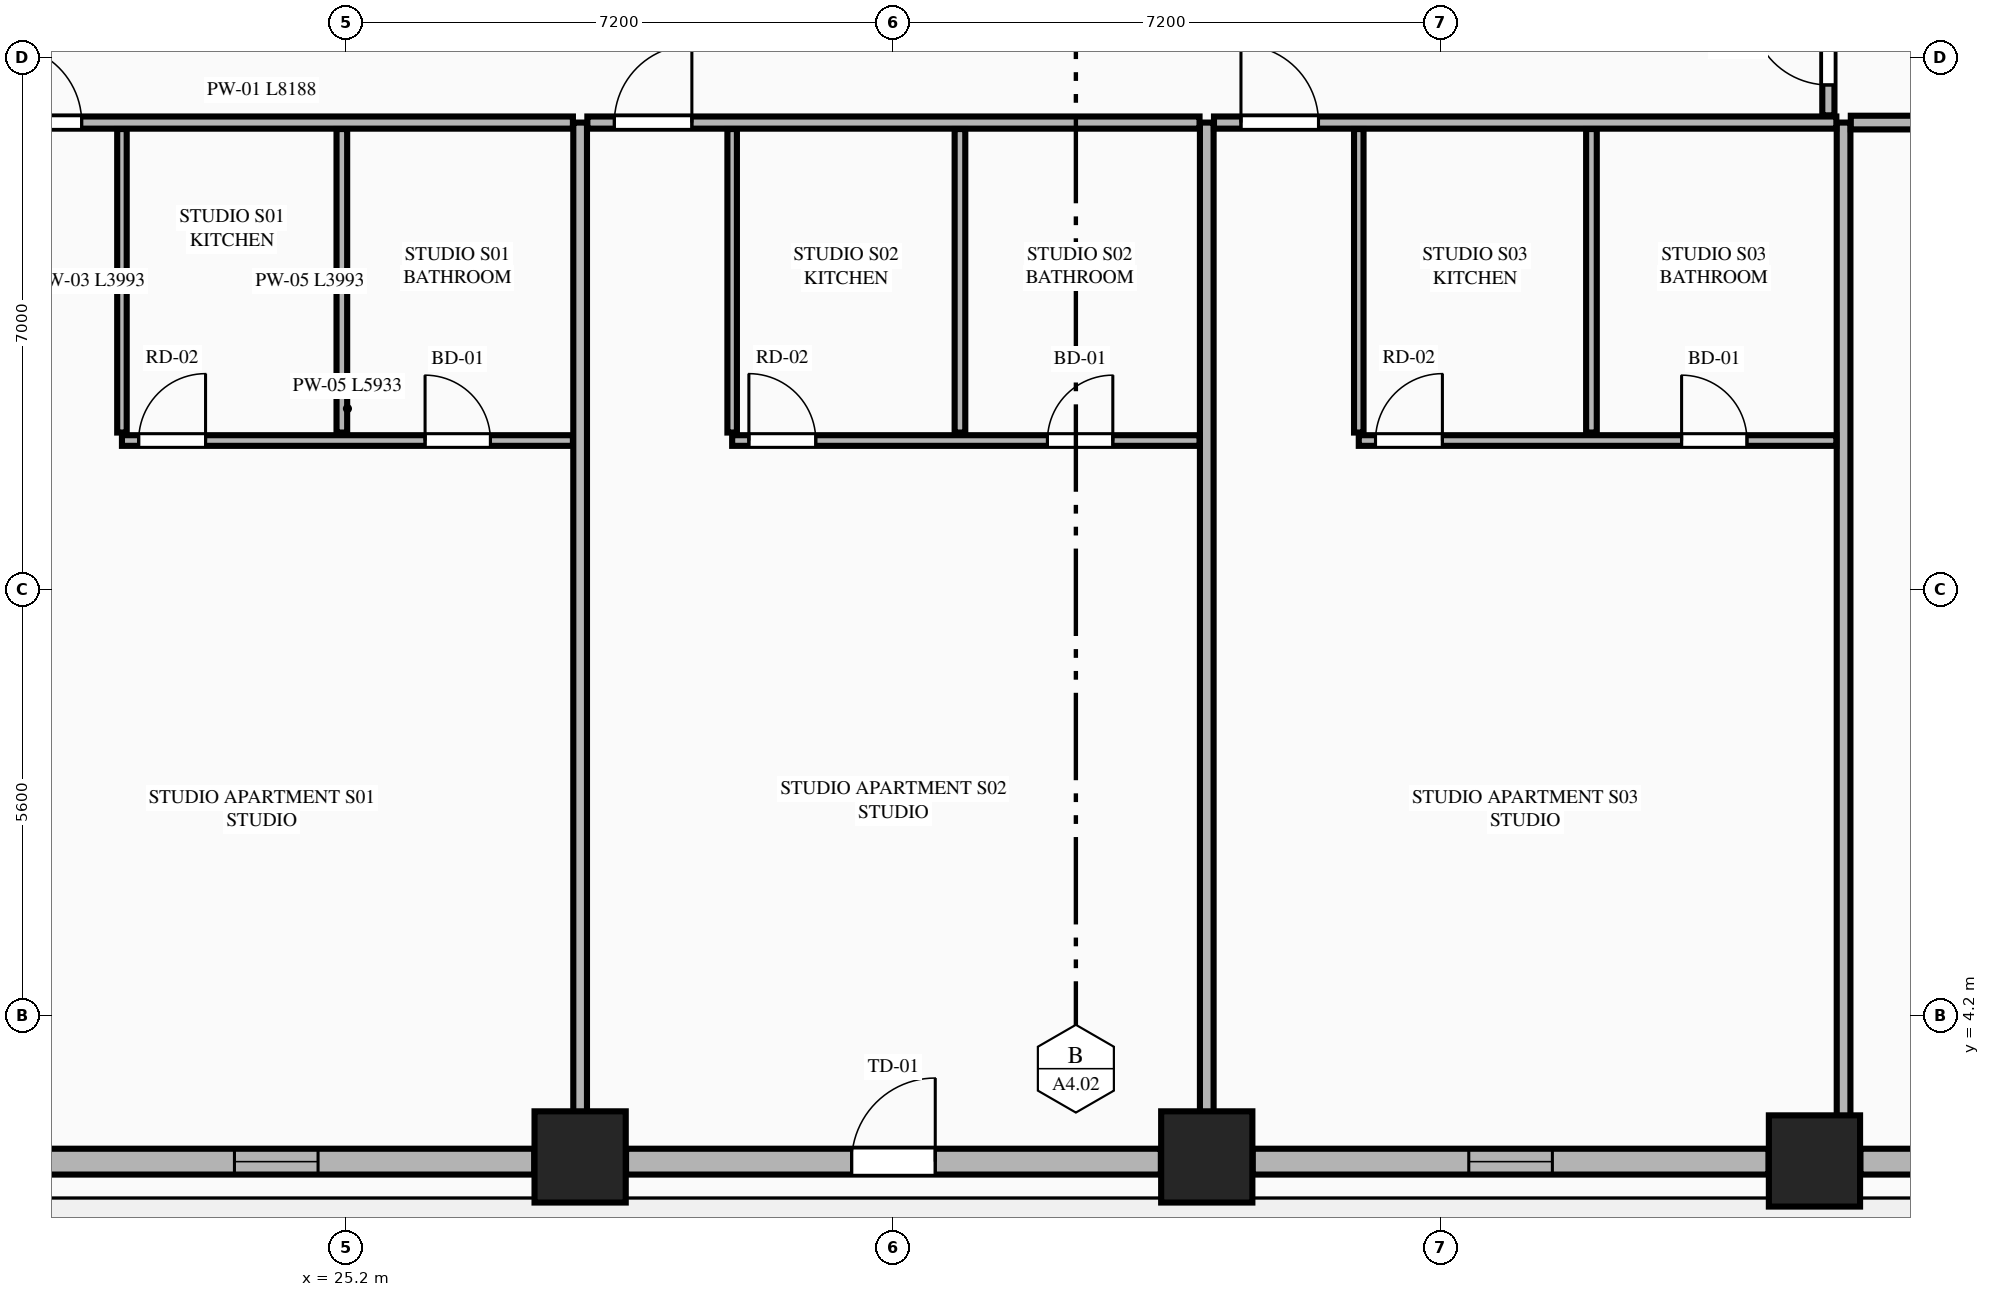
"""IFC4 building model, lengths in metres.
Left out: names, types, materials, properties, quantities, classifications, styles, units other than length and angle.
Written with IfcOpenShell. Run it as: python <this file> out.ifc"""

import sys

from ifc_helpers import new_model, si_unit, direction, frame, frame_2d, origin, origin_2d, place, context, subcontext, project, spatial, rectangle, extrude, element, fill, save


model = new_model("IFC4")
c1 = context("Model", 3, precision=1e-05, world=origin(), true_north=direction((0.0, 1.0)))
c2 = subcontext(c1, "Body", "Model", "MODEL_VIEW")
j1 = project(units=[si_unit("LENGTHUNIT", "METRE"), si_unit("PLANEANGLEUNIT", "RADIAN")], contexts=[c1])
p1 = place(None, origin())
s1 = spatial("IfcSite", under=j1, at=p1, CompositionType="ELEMENT")
p2 = place(p1, origin())
s2 = spatial("IfcBuilding", under=s1, at=p2, CompositionType="ELEMENT")
p3 = place(p2, frame((0.0, 0.0, 42.65)))
s3 = spatial("IfcBuildingStorey", under=s2, at=p3, CompositionType="ELEMENT", Elevation=42.65)
for number, where, z_axis, x_axis in (
    (1, (28.278, 2.342, 0.0), (0.0, 0.0, 1.0), (1.0, 0.0, 0.0)),
    (2, (36.522, 2.342, 0.0), (0.0, 0.0, 1.0), (1.0, 0.0, 0.0)),
    (3, (44.517, 2.289, 0.0), (0.0, 0.0, 1.0), (1.0, 0.0, 0.0)),
):
    element("IfcColumn", number, at=place(p3, frame(where, z_axis=z_axis, x_axis=x_axis)), inside=s3, PredefinedType="COLUMN", context=c2, shape_type="SweptSolid", body=[
        extrude(rectangle(XDim=1.2, YDim=1.2, at=origin_2d()), origin(), (0.0, 0.0, 1.0), 3.55),
    ])
p4 = place(p3, frame((20.887, 2.28, 0.0), z_axis=(0.0, 0.0, 1.0), x_axis=(1.0, 0.0, 0.0)))
e4 = element("IfcWall", 4, at=p4, inside=s3, PredefinedType="STANDARD", context=c2, shape_type="SweptSolid", body=[
    extrude(rectangle(XDim=6.787, YDim=0.34, at=frame_2d((3.394, 0.0))), origin(), (0.0, 0.0, 1.0), 2.787),
])
p5 = place(p4, frame((2.843, 0.0, 0.75)))
e5 = element("IfcOpeningElement", 5, at=p5, cuts=e4, PredefinedType="OPENING", context=c2, shape_type="SweptSolid", body=[
    extrude(rectangle(XDim=1.1, YDim=1.887, at=frame_2d((0.55, 0.943))), frame((0.0, 0.18, 0.0), z_axis=(0.0, -1.0, 0.0), x_axis=(1.0, 0.0, 0.0)), (0.0, 0.0, 1.0), 0.36),
])
p6 = place(p3, frame((28.882, 2.28, 0.0), z_axis=(0.0, 0.0, 1.0), x_axis=(1.0, 0.0, 0.0)))
e6 = element("IfcWall", 6, at=p6, inside=s3, PredefinedType="STANDARD", context=c2, shape_type="SweptSolid", body=[
    extrude(rectangle(XDim=7.036, YDim=0.34, at=frame_2d((3.518, 0.0))), origin(), (0.0, 0.0, 1.0), 2.787),
])
p7 = place(p6, frame((2.968, 0.0, 0.0)))
e7 = element("IfcOpeningElement", 7, at=p7, cuts=e6, PredefinedType="OPENING", context=c2, shape_type="SweptSolid", body=[
    extrude(rectangle(XDim=1.1, YDim=2.25, at=frame_2d((0.55, 1.125))), frame((0.0, 0.18, 0.0), z_axis=(0.0, -1.0, 0.0), x_axis=(1.0, 0.0, 0.0)), (0.0, 0.0, 1.0), 0.36),
])
p8 = place(p3, frame((37.126, 2.28, 0.0), z_axis=(0.0, 0.0, 1.0), x_axis=(1.0, 0.0, 0.0)))
e8 = element("IfcWall", 8, at=p8, inside=s3, PredefinedType="STANDARD", context=c2, shape_type="SweptSolid", body=[
    extrude(rectangle(XDim=6.787, YDim=0.34, at=frame_2d((3.394, 0.0))), origin(), (0.0, 0.0, 1.0), 2.787),
])
p9 = place(p8, frame((2.843, 0.0, 0.75)))
e9 = element("IfcOpeningElement", 9, at=p9, cuts=e8, PredefinedType="OPENING", context=c2, shape_type="SweptSolid", body=[
    extrude(rectangle(XDim=1.1, YDim=1.887, at=frame_2d((0.55, 0.943))), frame((0.0, 0.18, 0.0), z_axis=(0.0, -1.0, 0.0), x_axis=(1.0, 0.0, 0.0)), (0.0, 0.0, 1.0), 0.36),
])
p10 = place(p3, frame((45.121, 2.28, 0.0), z_axis=(0.0, 0.0, 1.0), x_axis=(1.0, 0.0, 0.0)))
e10 = element("IfcWall", 10, at=p10, inside=s3, PredefinedType="STANDARD", context=c2, shape_type="SweptSolid", body=[
    extrude(rectangle(XDim=1.245, YDim=0.34, at=frame_2d((0.623, 0.0))), origin(), (0.0, 0.0, 1.0), 3.33),
])
for number, where, z_axis, x_axis in (
    (11, (28.278, 2.455, 0.0), (0.0, 0.0, 1.0), (0.0, 1.0, 0.0)),
    (12, (36.522, 2.455, 0.0), (0.0, 0.0, 1.0), (0.0, 1.0, 0.0)),
):
    element("IfcWall", number, at=place(p3, frame(where, z_axis=z_axis, x_axis=x_axis)), inside=s3, PredefinedType="PARTITIONING", context=c2, shape_type="SweptSolid", body=[
        extrude(rectangle(XDim=13.495, YDim=0.18, at=frame_2d((6.748, 0.0))), origin(), (0.0, 0.0, 1.0), 2.7),
    ])
p11 = place(p3, frame((44.9, 2.455, 0.0), z_axis=(0.0, 0.0, 1.0), x_axis=(0.0, 1.0, 0.0)))
e13 = element("IfcWall", 13, at=p11, inside=s3, PredefinedType="PARTITIONING", context=c2, shape_type="SweptSolid", body=[
    extrude(rectangle(XDim=13.495, YDim=0.18, at=frame_2d((6.748, 0.0))), origin(), (0.0, 0.0, 1.0), 3.33),
])
p12 = place(p3, frame((19.995, 15.95, 0.0), z_axis=(0.0, 0.0, 1.0), x_axis=(1.0, 0.0, 0.0)))
e14 = element("IfcWall", 14, at=p12, inside=s3, PredefinedType="PARTITIONING", context=c2, shape_type="SweptSolid", body=[
    extrude(rectangle(XDim=8.188, YDim=0.16, at=frame_2d((4.094, 0.0))), origin(), (0.0, 0.0, 1.0), 3.33),
])
p13 = place(p12, frame((0.705, 0.0, 0.0)))
e15 = element("IfcOpeningElement", 15, at=p13, cuts=e14, PredefinedType="OPENING", context=c2, shape_type="SweptSolid", body=[
    extrude(rectangle(XDim=1.02, YDim=2.25, at=frame_2d((0.51, 1.125))), frame((0.0, 0.09, 0.0), z_axis=(0.0, -1.0, 0.0), x_axis=(1.0, 0.0, 0.0)), (0.0, 0.0, 1.0), 0.18),
])
p14 = place(p3, frame((22.25, 11.872, 0.0), z_axis=(0.0, 0.0, 1.0), x_axis=(0.0, 1.0, 0.0)))
e16 = element("IfcWall", 16, at=p14, inside=s3, PredefinedType="PARTITIONING", context=c2, shape_type="SweptSolid", body=[
    extrude(rectangle(XDim=3.993, YDim=0.125, at=frame_2d((1.997, 0.0))), origin(), (0.0, 0.0, 1.0), 2.7),
])
p15 = place(p3, frame((22.25, 11.767, 0.0), z_axis=(0.0, 0.0, 1.0), x_axis=(1.0, 0.0, 0.0)))
e17 = element("IfcWall", 17, at=p15, inside=s3, PredefinedType="PLUMBINGWALL", context=c2, shape_type="SweptSolid", body=[
    extrude(rectangle(XDim=5.933, YDim=0.14, at=frame_2d((2.967, 0.0))), origin(), (0.0, 0.0, 1.0), 3.33),
])
p16 = place(p15, frame((3.988, 0.0, 0.0)))
e18 = element("IfcOpeningElement", 18, at=p16, cuts=e17, PredefinedType="OPENING", context=c2, shape_type="SweptSolid", body=[
    extrude(rectangle(XDim=0.86, YDim=2.1, at=frame_2d((0.43, 1.05))), frame((0.0, 0.08, 0.0), z_axis=(0.0, -1.0, 0.0), x_axis=(1.0, 0.0, 0.0)), (0.0, 0.0, 1.0), 0.16),
])
p17 = place(p15, frame((0.22, 0.0, 0.0)))
e19 = element("IfcOpeningElement", 19, at=p17, cuts=e17, PredefinedType="OPENING", context=c2, shape_type="SweptSolid", body=[
    extrude(rectangle(XDim=0.88, YDim=2.15, at=frame_2d((0.44, 1.075))), frame((0.0, 0.08, 0.0), z_axis=(0.0, -1.0, 0.0), x_axis=(1.0, 0.0, 0.0)), (0.0, 0.0, 1.0), 0.16),
])
p18 = place(p3, frame((25.143, 11.872, 0.0), z_axis=(0.0, 0.0, 1.0), x_axis=(0.0, 1.0, 0.0)))
e20 = element("IfcWall", 20, at=p18, inside=s3, PredefinedType="PLUMBINGWALL", context=c2, shape_type="SweptSolid", body=[
    extrude(rectangle(XDim=3.993, YDim=0.14, at=frame_2d((1.997, 0.0))), origin(), (0.0, 0.0, 1.0), 3.33),
])
p19 = place(p3, frame((28.373, 15.95, 0.0), z_axis=(0.0, 0.0, 1.0), x_axis=(1.0, 0.0, 0.0)))
e21 = element("IfcWall", 21, at=p19, inside=s3, PredefinedType="PARTITIONING", context=c2, shape_type="SweptSolid", body=[
    extrude(rectangle(XDim=8.054, YDim=0.16, at=frame_2d((4.027, 0.0))), origin(), (0.0, 0.0, 1.0), 3.33),
])
p20 = place(p19, frame((0.355, 0.0, 0.0)))
e22 = element("IfcOpeningElement", 22, at=p20, cuts=e21, PredefinedType="OPENING", context=c2, shape_type="SweptSolid", body=[
    extrude(rectangle(XDim=1.02, YDim=2.25, at=frame_2d((0.51, 1.125))), frame((0.0, 0.09, 0.0), z_axis=(0.0, -1.0, 0.0), x_axis=(1.0, 0.0, 0.0)), (0.0, 0.0, 1.0), 0.18),
])
p21 = place(p3, frame((30.278, 11.872, 0.0), z_axis=(0.0, 0.0, 1.0), x_axis=(0.0, 1.0, 0.0)))
e23 = element("IfcWall", 23, at=p21, inside=s3, PredefinedType="PARTITIONING", context=c2, shape_type="SweptSolid", body=[
    extrude(rectangle(XDim=3.993, YDim=0.125, at=frame_2d((1.997, 0.0))), origin(), (0.0, 0.0, 1.0), 3.33),
])
p22 = place(p3, frame((30.278, 11.767, 0.0), z_axis=(0.0, 0.0, 1.0), x_axis=(1.0, 0.0, 0.0)))
e24 = element("IfcWall", 24, at=p22, inside=s3, PredefinedType="PLUMBINGWALL", context=c2, shape_type="SweptSolid", body=[
    extrude(rectangle(XDim=6.149, YDim=0.14, at=frame_2d((3.074, 0.0))), origin(), (0.0, 0.0, 1.0), 3.33),
])
p23 = place(p22, frame((4.148, 0.0, 0.0)))
e25 = element("IfcOpeningElement", 25, at=p23, cuts=e24, PredefinedType="OPENING", context=c2, shape_type="SweptSolid", body=[
    extrude(rectangle(XDim=0.86, YDim=2.1, at=frame_2d((0.43, 1.05))), frame((0.0, 0.08, 0.0), z_axis=(0.0, -1.0, 0.0), x_axis=(1.0, 0.0, 0.0)), (0.0, 0.0, 1.0), 0.16),
])
p24 = place(p22, frame((0.22, 0.0, 0.0)))
e26 = element("IfcOpeningElement", 26, at=p24, cuts=e24, PredefinedType="OPENING", context=c2, shape_type="SweptSolid", body=[
    extrude(rectangle(XDim=0.88, YDim=2.15, at=frame_2d((0.44, 1.075))), frame((0.0, 0.08, 0.0), z_axis=(0.0, -1.0, 0.0), x_axis=(1.0, 0.0, 0.0)), (0.0, 0.0, 1.0), 0.16),
])
p25 = place(p3, frame((33.275, 11.872, 0.0), z_axis=(0.0, 0.0, 1.0), x_axis=(0.0, 1.0, 0.0)))
e27 = element("IfcWall", 27, at=p25, inside=s3, PredefinedType="PLUMBINGWALL", context=c2, shape_type="SweptSolid", body=[
    extrude(rectangle(XDim=3.993, YDim=0.14, at=frame_2d((1.997, 0.0))), origin(), (0.0, 0.0, 1.0), 3.33),
])
p26 = place(p3, frame((36.617, 15.95, 0.0), z_axis=(0.0, 0.0, 1.0), x_axis=(1.0, 0.0, 0.0)))
e28 = element("IfcWall", 28, at=p26, inside=s3, PredefinedType="PARTITIONING", context=c2, shape_type="SweptSolid", body=[
    extrude(rectangle(XDim=8.188, YDim=0.16, at=frame_2d((4.094, 0.0))), origin(), (0.0, 0.0, 1.0), 3.33),
])
p27 = place(p26, frame((0.355, 0.0, 0.0)))
e29 = element("IfcOpeningElement", 29, at=p27, cuts=e28, PredefinedType="OPENING", context=c2, shape_type="SweptSolid", body=[
    extrude(rectangle(XDim=1.02, YDim=2.25, at=frame_2d((0.51, 1.125))), frame((0.0, 0.09, 0.0), z_axis=(0.0, -1.0, 0.0), x_axis=(1.0, 0.0, 0.0)), (0.0, 0.0, 1.0), 0.18),
])
p28 = place(p3, frame((38.522, 11.872, 0.0), z_axis=(0.0, 0.0, 1.0), x_axis=(0.0, 1.0, 0.0)))
e30 = element("IfcWall", 30, at=p28, inside=s3, PredefinedType="PARTITIONING", context=c2, shape_type="SweptSolid", body=[
    extrude(rectangle(XDim=3.993, YDim=0.125, at=frame_2d((1.997, 0.0))), origin(), (0.0, 0.0, 1.0), 3.33),
])
p29 = place(p3, frame((38.522, 11.767, 0.0), z_axis=(0.0, 0.0, 1.0), x_axis=(1.0, 0.0, 0.0)))
e31 = element("IfcWall", 31, at=p29, inside=s3, PredefinedType="PLUMBINGWALL", context=c2, shape_type="SweptSolid", body=[
    extrude(rectangle(XDim=6.283, YDim=0.14, at=frame_2d((3.142, 0.0))), origin(), (0.0, 0.0, 1.0), 3.33),
])
p30 = place(p29, frame((4.247, 0.0, 0.0)))
e32 = element("IfcOpeningElement", 32, at=p30, cuts=e31, PredefinedType="OPENING", context=c2, shape_type="SweptSolid", body=[
    extrude(rectangle(XDim=0.86, YDim=2.1, at=frame_2d((0.43, 1.05))), frame((0.0, 0.08, 0.0), z_axis=(0.0, -1.0, 0.0), x_axis=(1.0, 0.0, 0.0)), (0.0, 0.0, 1.0), 0.16),
])
p31 = place(p29, frame((0.22, 0.0, 0.0)))
e33 = element("IfcOpeningElement", 33, at=p31, cuts=e31, PredefinedType="OPENING", context=c2, shape_type="SweptSolid", body=[
    extrude(rectangle(XDim=0.88, YDim=2.15, at=frame_2d((0.44, 1.075))), frame((0.0, 0.08, 0.0), z_axis=(0.0, -1.0, 0.0), x_axis=(1.0, 0.0, 0.0)), (0.0, 0.0, 1.0), 0.16),
])
p32 = place(p3, frame((41.583, 11.872, 0.0), z_axis=(0.0, 0.0, 1.0), x_axis=(0.0, 1.0, 0.0)))
e34 = element("IfcWall", 34, at=p32, inside=s3, PredefinedType="PLUMBINGWALL", context=c2, shape_type="SweptSolid", body=[
    extrude(rectangle(XDim=3.993, YDim=0.14, at=frame_2d((1.997, 0.0))), origin(), (0.0, 0.0, 1.0), 3.33),
])
p33 = place(p3, frame((44.995, 15.95, 0.0), z_axis=(0.0, 0.0, 1.0), x_axis=(1.0, 0.0, 0.0)))
e35 = element("IfcWall", 35, at=p33, inside=s3, PredefinedType="PARTITIONING", context=c2, shape_type="SweptSolid", body=[
    extrude(rectangle(XDim=9.241, YDim=0.18, at=frame_2d((4.621, 0.0))), origin(), (0.0, 0.0, 1.0), 3.33),
])
p34 = place(p3, frame((44.7, 16.045, 0.0), z_axis=(0.0, 0.0, 1.0), x_axis=(0.0, 1.0, 0.0)))
e36 = element("IfcWall", 36, at=p34, inside=s3, PredefinedType="PARTITIONING", context=c2, shape_type="SweptSolid", body=[
    extrude(rectangle(XDim=8.168, YDim=0.16, at=frame_2d((4.084, 0.0))), origin(), (0.0, 0.0, 1.0), 2.7),
])
p35 = place(p34, frame((0.4, 0.0, 0.0)))
e37 = element("IfcOpeningElement", 37, at=p35, cuts=e36, PredefinedType="OPENING", context=c2, shape_type="SweptSolid", body=[
    extrude(rectangle(XDim=1.02, YDim=2.25, at=frame_2d((0.51, 1.125))), frame((0.0, 0.09, 0.0), z_axis=(0.0, -1.0, 0.0), x_axis=(1.0, 0.0, 0.0)), (0.0, 0.0, 1.0), 0.18),
])
p36 = place(p5, origin())
e38 = element("IfcWindow", 38, at=p36, inside=s3, PartitioningType="SINGLE_PANEL", PredefinedType="WINDOW", context=c2, shape_type="SweptSolid", body=[
    extrude(rectangle(XDim=1.1, YDim=1.887, at=frame_2d((0.55, 0.943))), frame((0.0, 0.03, 0.0), z_axis=(0.0, -1.0, 0.0), x_axis=(1.0, 0.0, 0.0)), (0.0, 0.0, 1.0), 0.06),
])
fill(e5, e38)
p37 = place(p7, origin())
e39 = element("IfcDoor", 39, at=p37, inside=s3, OperationType="SINGLE_SWING_RIGHT", PredefinedType="DOOR", context=c2, shape_type="SweptSolid", body=[
    extrude(rectangle(XDim=1.1, YDim=2.25, at=frame_2d((0.55, 1.125))), frame((0.0, 0.025, 0.0), z_axis=(0.0, -1.0, 0.0), x_axis=(1.0, 0.0, 0.0)), (0.0, 0.0, 1.0), 0.05),
])
fill(e7, e39)
p38 = place(p9, origin())
e40 = element("IfcWindow", 40, at=p38, inside=s3, PartitioningType="SINGLE_PANEL", PredefinedType="WINDOW", context=c2, shape_type="SweptSolid", body=[
    extrude(rectangle(XDim=1.1, YDim=1.887, at=frame_2d((0.55, 0.943))), frame((0.0, 0.03, 0.0), z_axis=(0.0, -1.0, 0.0), x_axis=(1.0, 0.0, 0.0)), (0.0, 0.0, 1.0), 0.06),
])
fill(e9, e40)
p39 = place(p16, origin())
e41 = element("IfcDoor", 41, at=p39, inside=s3, OperationType="SINGLE_SWING_LEFT", PredefinedType="DOOR", context=c2, shape_type="SweptSolid", body=[
    extrude(rectangle(XDim=0.86, YDim=2.1, at=frame_2d((0.43, 1.05))), frame((0.0, 0.025, 0.0), z_axis=(0.0, -1.0, 0.0), x_axis=(1.0, 0.0, 0.0)), (0.0, 0.0, 1.0), 0.05),
])
fill(e18, e41)
p40 = place(p13, origin())
e42 = element("IfcDoor", 42, at=p40, inside=s3, OperationType="SINGLE_SWING_LEFT", PredefinedType="DOOR", context=c2, shape_type="SweptSolid", body=[
    extrude(rectangle(XDim=1.02, YDim=2.25, at=frame_2d((0.51, 1.125))), frame((0.0, 0.025, 0.0), z_axis=(0.0, -1.0, 0.0), x_axis=(1.0, 0.0, 0.0)), (0.0, 0.0, 1.0), 0.05),
])
fill(e15, e42)
p41 = place(p17, origin())
e43 = element("IfcDoor", 43, at=p41, inside=s3, OperationType="SINGLE_SWING_RIGHT", PredefinedType="DOOR", context=c2, shape_type="SweptSolid", body=[
    extrude(rectangle(XDim=0.88, YDim=2.15, at=frame_2d((0.44, 1.075))), frame((0.0, 0.025, 0.0), z_axis=(0.0, -1.0, 0.0), x_axis=(1.0, 0.0, 0.0)), (0.0, 0.0, 1.0), 0.05),
])
fill(e19, e43)
p42 = place(p23, origin())
e44 = element("IfcDoor", 44, at=p42, inside=s3, OperationType="SINGLE_SWING_RIGHT", PredefinedType="DOOR", context=c2, shape_type="SweptSolid", body=[
    extrude(rectangle(XDim=0.86, YDim=2.1, at=frame_2d((0.43, 1.05))), frame((0.0, 0.025, 0.0), z_axis=(0.0, -1.0, 0.0), x_axis=(1.0, 0.0, 0.0)), (0.0, 0.0, 1.0), 0.05),
])
fill(e25, e44)
p43 = place(p20, origin())
e45 = element("IfcDoor", 45, at=p43, inside=s3, OperationType="SINGLE_SWING_RIGHT", PredefinedType="DOOR", context=c2, shape_type="SweptSolid", body=[
    extrude(rectangle(XDim=1.02, YDim=2.25, at=frame_2d((0.51, 1.125))), frame((0.0, 0.025, 0.0), z_axis=(0.0, -1.0, 0.0), x_axis=(1.0, 0.0, 0.0)), (0.0, 0.0, 1.0), 0.05),
])
fill(e22, e45)
p44 = place(p24, origin())
e46 = element("IfcDoor", 46, at=p44, inside=s3, OperationType="SINGLE_SWING_LEFT", PredefinedType="DOOR", context=c2, shape_type="SweptSolid", body=[
    extrude(rectangle(XDim=0.88, YDim=2.15, at=frame_2d((0.44, 1.075))), frame((0.0, 0.025, 0.0), z_axis=(0.0, -1.0, 0.0), x_axis=(1.0, 0.0, 0.0)), (0.0, 0.0, 1.0), 0.05),
])
fill(e26, e46)
p45 = place(p30, origin())
e47 = element("IfcDoor", 47, at=p45, inside=s3, OperationType="SINGLE_SWING_LEFT", PredefinedType="DOOR", context=c2, shape_type="SweptSolid", body=[
    extrude(rectangle(XDim=0.86, YDim=2.1, at=frame_2d((0.43, 1.05))), frame((0.0, 0.025, 0.0), z_axis=(0.0, -1.0, 0.0), x_axis=(1.0, 0.0, 0.0)), (0.0, 0.0, 1.0), 0.05),
])
fill(e32, e47)
p46 = place(p27, origin())
e48 = element("IfcDoor", 48, at=p46, inside=s3, OperationType="SINGLE_SWING_LEFT", PredefinedType="DOOR", context=c2, shape_type="SweptSolid", body=[
    extrude(rectangle(XDim=1.02, YDim=2.25, at=frame_2d((0.51, 1.125))), frame((0.0, 0.025, 0.0), z_axis=(0.0, -1.0, 0.0), x_axis=(1.0, 0.0, 0.0)), (0.0, 0.0, 1.0), 0.05),
])
fill(e29, e48)
p47 = place(p31, origin())
e49 = element("IfcDoor", 49, at=p47, inside=s3, OperationType="SINGLE_SWING_RIGHT", PredefinedType="DOOR", context=c2, shape_type="SweptSolid", body=[
    extrude(rectangle(XDim=0.88, YDim=2.15, at=frame_2d((0.44, 1.075))), frame((0.0, 0.025, 0.0), z_axis=(0.0, -1.0, 0.0), x_axis=(1.0, 0.0, 0.0)), (0.0, 0.0, 1.0), 0.05),
])
fill(e33, e49)
p48 = place(p35, origin())
e50 = element("IfcDoor", 50, at=p48, inside=s3, OperationType="SINGLE_SWING_RIGHT", PredefinedType="DOOR", context=c2, shape_type="SweptSolid", body=[
    extrude(rectangle(XDim=1.02, YDim=2.25, at=frame_2d((0.51, 1.125))), frame((0.0, 0.025, 0.0), z_axis=(0.0, -1.0, 0.0), x_axis=(1.0, 0.0, 0.0)), (0.0, 0.0, 1.0), 0.05),
])
fill(e37, e50)
save(model, sys.argv[1])
